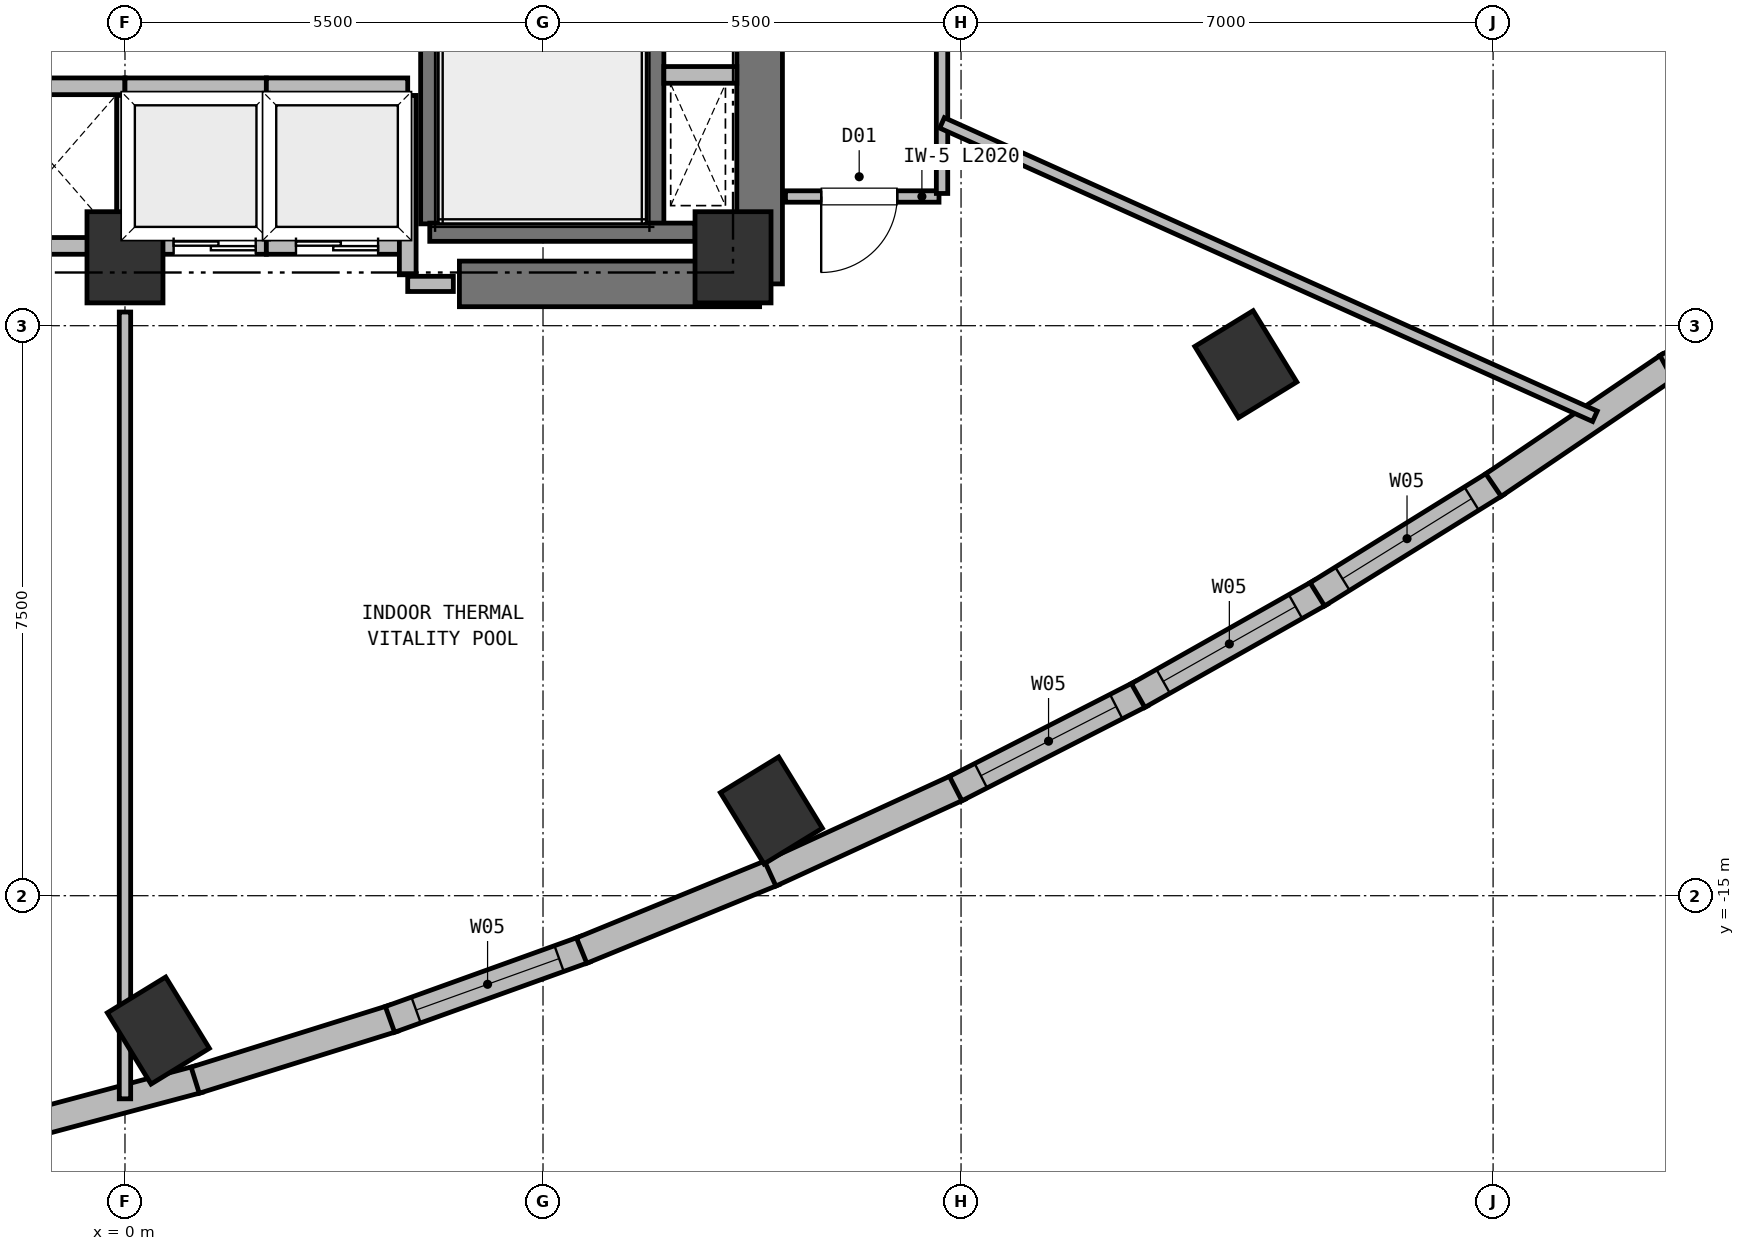
"""IFC4 building model, lengths in metres.
Left out: names, types, materials, properties, quantities, classifications, styles, units other than length and angle.
Written with IfcOpenShell. Run it as: python <this file> out.ifc"""

import sys

from ifc_helpers import new_model, si_unit, direction, frame, frame_2d, origin, origin_2d, place, context, subcontext, project, spatial, rectangle, extrude, element, fill, save


model = new_model("IFC4")
c1 = context("Model", 3, precision=1e-05, world=origin(), true_north=direction((0.0, 1.0)))
c2 = subcontext(c1, "Body", "Model", "MODEL_VIEW")
j1 = project(units=[si_unit("LENGTHUNIT", "METRE"), si_unit("PLANEANGLEUNIT", "RADIAN")], contexts=[c1])
p1 = place(None, origin())
s1 = spatial("IfcSite", under=j1, at=p1, CompositionType="ELEMENT")
p2 = place(p1, origin())
s2 = spatial("IfcBuilding", under=s1, at=p2, CompositionType="ELEMENT")
p3 = place(p2, frame((0.0, 0.0, 92.75)))
s3 = spatial("IfcBuildingStorey", under=s2, at=p3, CompositionType="ELEMENT", Elevation=92.75)
for number, where, z_axis, x_axis in (
    (1, (0.0, -6.6, 0.0), (0.0, 0.0, 1.0), (1.0, 0.0, 0.0)),
    (2, (8.0, -6.6, 0.0), (0.0, 0.0, 1.0), (1.0, 0.0, 0.0)),
):
    element("IfcColumn", number, at=place(p3, frame(where, z_axis=z_axis, x_axis=x_axis)), inside=s3, PredefinedType="COLUMN", context=c2, shape_type="SweptSolid", body=[
        extrude(rectangle(XDim=1.0, YDim=1.2, at=origin_2d()), origin(), (0.0, 0.0, 1.0), 4.5),
    ])
p4 = place(p3, frame((4.4, -6.95, 0.0), z_axis=(0.0, 0.0, 1.0), x_axis=(1.0, 0.0, 0.0)))
e3 = element("IfcWall", 3, at=p4, inside=s3, PredefinedType="SHEAR", context=c2, shape_type="SweptSolid", body=[
    extrude(rectangle(XDim=3.95, YDim=0.6, at=frame_2d((1.975, 0.0))), origin(), (0.0, 0.0, 1.0), 4.25),
])
p5 = place(p3, frame((8.35, -6.95, 0.0), z_axis=(0.0, 0.0, 1.0), x_axis=(0.0, 1.0, 0.0)))
e4 = element("IfcWall", 4, at=p5, inside=s3, PredefinedType="SHEAR", context=c2, shape_type="SweptSolid", body=[
    extrude(rectangle(XDim=8.1, YDim=0.6, at=frame_2d((4.05, 0.0))), origin(), (0.0, 0.0, 1.0), 4.25),
])
for number, where, z_axis, x_axis in (
    (5, (0.439, -16.774, 0.0), (0.0, 0.0, 1.0), (0.853, 0.522, 0.0)),
    (6, (8.504, -13.878, 0.0), (0.0, 0.0, 1.0), (0.853, 0.522, 0.0)),
    (7, (14.747, -8.007, 0.0), (0.0, 0.0, 1.0), (0.853, 0.522, 0.0)),
):
    element("IfcColumn", number, at=place(p3, frame(where, z_axis=z_axis, x_axis=x_axis)), inside=s3, PredefinedType="COLUMN", context=c2, shape_type="SweptSolid", body=[
        extrude(rectangle(XDim=0.9, YDim=1.1, at=origin_2d()), origin(), (0.0, 0.0, 1.0), 4.5),
    ])
p6 = place(p3, frame((0.972, -17.413, 0.0), z_axis=(0.0, 0.0, 1.0), x_axis=(-0.966234939601, -0.25766265056, 0.0)))
e8 = element("IfcWall", 8, at=p6, inside=s3, PredefinedType="SOLIDWALL", context=c2, shape_type="SweptSolid", body=[
    extrude(rectangle(XDim=2.744, YDim=0.36, at=frame_2d((1.372, 0.0))), origin(), (0.0, 0.0, 1.0), 4.25),
])
p7 = place(p3, frame((3.534, -16.612, 0.0), z_axis=(0.0, 0.0, 1.0), x_axis=(-0.954503804453, -0.298198737899, 0.0)))
e9 = element("IfcWall", 9, at=p7, inside=s3, PredefinedType="SOLIDWALL", context=c2, shape_type="SweptSolid", body=[
    extrude(rectangle(XDim=2.735, YDim=0.36, at=frame_2d((1.367, 0.0))), origin(), (0.0, 0.0, 1.0), 4.25),
])
p8 = place(p3, frame((6.055, -15.704, 0.0), z_axis=(0.0, 0.0, 1.0), x_axis=(-0.940978598113, -0.338466066089, 0.0)))
e10 = element("IfcWall", 10, at=p8, inside=s3, PredefinedType="SOLIDWALL", context=c2, shape_type="SweptSolid", body=[
    extrude(rectangle(XDim=2.729, YDim=0.36, at=frame_2d((1.365, 0.0))), origin(), (0.0, 0.0, 1.0), 4.25),
])
p9 = place(p8, frame((0.365, 0.0, 0.72)))
e11 = element("IfcOpeningElement", 11, at=p9, cuts=e10, PredefinedType="OPENING", context=c2, shape_type="SweptSolid", body=[
    extrude(rectangle(XDim=2.0, YDim=2.15, at=frame_2d((1.0, 1.075))), frame((0.0, 0.19, 0.0), z_axis=(0.0, -1.0, 0.0), x_axis=(1.0, 0.0, 0.0)), (0.0, 0.0, 1.0), 0.38),
])
p10 = place(p3, frame((8.535, -14.69, 0.0), z_axis=(0.0, 0.0, 1.0), x_axis=(-0.925769066795, -0.378089453656, 0.0)))
e12 = element("IfcWall", 12, at=p10, inside=s3, PredefinedType="SOLIDWALL", context=c2, shape_type="SweptSolid", body=[
    extrude(rectangle(XDim=2.729, YDim=0.36, at=frame_2d((1.365, 0.0))), origin(), (0.0, 0.0, 1.0), 4.25),
])
p11 = place(p3, frame((10.975, -13.569, 0.0), z_axis=(0.0, 0.0, 1.0), x_axis=(-0.908890021948, -0.417035883352, 0.0)))
e13 = element("IfcWall", 13, at=p11, inside=s3, PredefinedType="SOLIDWALL", context=c2, shape_type="SweptSolid", body=[
    extrude(rectangle(XDim=2.734, YDim=0.36, at=frame_2d((1.367, 0.0))), origin(), (0.0, 0.0, 1.0), 4.25),
])
p12 = place(p3, frame((13.373, -12.342, 0.0), z_axis=(0.0, 0.0, 1.0), x_axis=(-0.890460318586, -0.455060898148, 0.0)))
e14 = element("IfcWall", 14, at=p12, inside=s3, PredefinedType="SOLIDWALL", context=c2, shape_type="SweptSolid", body=[
    extrude(rectangle(XDim=2.744, YDim=0.36, at=frame_2d((1.372, 0.0))), origin(), (0.0, 0.0, 1.0), 4.25),
])
p13 = place(p12, frame((0.372, 0.0, 0.72)))
e15 = element("IfcOpeningElement", 15, at=p13, cuts=e14, PredefinedType="OPENING", context=c2, shape_type="SweptSolid", body=[
    extrude(rectangle(XDim=2.0, YDim=2.15, at=frame_2d((1.0, 1.075))), frame((0.0, 0.19, 0.0), z_axis=(0.0, -1.0, 0.0), x_axis=(1.0, 0.0, 0.0)), (0.0, 0.0, 1.0), 0.38),
])
p14 = place(p3, frame((15.731, -11.009, 0.0), z_axis=(0.0, 0.0, 1.0), x_axis=(-0.870678208182, -0.491853085582, 0.0)))
e16 = element("IfcWall", 16, at=p14, inside=s3, PredefinedType="SOLIDWALL", context=c2, shape_type="SweptSolid", body=[
    extrude(rectangle(XDim=2.758, YDim=0.36, at=frame_2d((1.379, 0.0))), origin(), (0.0, 0.0, 1.0), 4.25),
])
p15 = place(p14, frame((0.379, 0.0, 0.72)))
e17 = element("IfcOpeningElement", 17, at=p15, cuts=e16, PredefinedType="OPENING", context=c2, shape_type="SweptSolid", body=[
    extrude(rectangle(XDim=2.0, YDim=2.15, at=frame_2d((1.0, 1.075))), frame((0.0, 0.19, 0.0), z_axis=(0.0, -1.0, 0.0), x_axis=(1.0, 0.0, 0.0)), (0.0, 0.0, 1.0), 0.38),
])
p16 = place(p3, frame((18.048, -9.57, 0.0), z_axis=(0.0, 0.0, 1.0), x_axis=(-0.84962386879, -0.527389117809, 0.0)))
e18 = element("IfcWall", 18, at=p16, inside=s3, PredefinedType="SOLIDWALL", context=c2, shape_type="SweptSolid", body=[
    extrude(rectangle(XDim=2.778, YDim=0.36, at=frame_2d((1.389, 0.0))), origin(), (0.0, 0.0, 1.0), 4.25),
])
p17 = place(p16, frame((0.389, 0.0, 0.72)))
e19 = element("IfcOpeningElement", 19, at=p17, cuts=e18, PredefinedType="OPENING", context=c2, shape_type="SweptSolid", body=[
    extrude(rectangle(XDim=2.0, YDim=2.15, at=frame_2d((1.0, 1.075))), frame((0.0, 0.19, 0.0), z_axis=(0.0, -1.0, 0.0), x_axis=(1.0, 0.0, 0.0)), (0.0, 0.0, 1.0), 0.38),
])
p18 = place(p3, frame((20.323, -8.024, 0.0), z_axis=(0.0, 0.0, 1.0), x_axis=(-0.82749023723, -0.56148010409, 0.0)))
e20 = element("IfcWall", 20, at=p18, inside=s3, PredefinedType="SOLIDWALL", context=c2, shape_type="SweptSolid", body=[
    extrude(rectangle(XDim=2.801, YDim=0.36, at=frame_2d((1.4, 0.0))), origin(), (0.0, 0.0, 1.0), 4.25),
])
p19 = place(p3, frame((21.587, -7.341, 0.0), z_axis=(0.0, 0.0, 1.0), x_axis=(-0.87890460574, -0.476997582812, 0.0)))
e21 = element("IfcWall", 21, at=p19, inside=s3, PredefinedType="SOLIDWALL", context=c2, shape_type="SweptSolid", body=[
    extrude(rectangle(XDim=1.486, YDim=0.36, at=frame_2d((0.743, 0.0))), origin(), (0.0, 0.0, 1.0), 4.25),
])
for number, where, z_axis, x_axis in (
    (22, (4.01, -6.16, 0.0), (0.0, 0.0, 1.0), (0.0, 1.0, 0.0)),
    (23, (6.97, -6.16, 0.0), (0.0, 0.0, 1.0), (0.0, 1.0, 0.0)),
):
    element("IfcWall", number, at=place(p3, frame(where, z_axis=z_axis, x_axis=x_axis)), inside=s3, PredefinedType="SHEAR", context=c2, shape_type="SweptSolid", body=[
        extrude(rectangle(XDim=7.22, YDim=0.24, at=frame_2d((3.61, 0.0))), origin(), (0.0, 0.0, 1.0), 4.25),
    ])
p20 = place(p3, frame((4.01, -6.27, 0.0), z_axis=(0.0, 0.0, 1.0), x_axis=(1.0, 0.0, 0.0)))
e24 = element("IfcWall", 24, at=p20, inside=s3, PredefinedType="SHEAR", context=c2, shape_type="SweptSolid", body=[
    extrude(rectangle(XDim=3.49, YDim=0.24, at=frame_2d((1.745, 0.0))), origin(), (0.0, 0.0, 1.0), 4.25),
])
p21 = place(p3, frame((7.09, -4.2, 0.0), z_axis=(0.0, 0.0, 1.0), x_axis=(1.0, 0.0, 0.0)))
e25 = element("IfcWall", 25, at=p21, inside=s3, PredefinedType="PARTITIONING", context=c2, shape_type="SweptSolid", body=[
    extrude(rectangle(XDim=0.96, YDim=0.22, at=frame_2d((0.48, 0.0))), origin(), (0.0, 0.0, 1.0), 4.25),
])
p22 = place(p3, frame((-1.86, -6.45, 0.0), z_axis=(0.0, 0.0, 1.0), x_axis=(1.0, 0.0, 0.0)))
e26 = element("IfcWall", 26, at=p22, inside=s3, PredefinedType="PARTITIONING", context=c2, shape_type="SweptSolid", body=[
    extrude(rectangle(XDim=1.86, YDim=0.22, at=frame_2d((0.93, 0.0))), origin(), (0.0, 0.0, 1.0), 3.87),
])
for number, where, z_axis, x_axis in (
    (27, (-1.86, -4.35, 0.0), (0.0, 0.0, 1.0), (1.0, 0.0, 0.0)),
    (28, (0.0, -6.33, 0.0), (0.0, 0.0, 1.0), (0.0, 1.0, 0.0)),
):
    element("IfcWall", number, at=place(p3, frame(where, z_axis=z_axis, x_axis=x_axis)), inside=s3, PredefinedType="PARTITIONING", context=c2, shape_type="SweptSolid", body=[
        extrude(rectangle(XDim=1.86, YDim=0.22, at=frame_2d((0.93, 0.0))), origin(), (0.0, 0.0, 1.0), 4.25),
    ])
p23 = place(p3, frame((0.0, -6.45, 0.0), z_axis=(0.0, 0.0, 1.0), x_axis=(1.0, 0.0, 0.0)))
e29 = element("IfcWall", 29, at=p23, inside=s3, PredefinedType="PARTITIONING", context=c2, shape_type="SweptSolid", body=[
    extrude(rectangle(XDim=1.86, YDim=0.22, at=frame_2d((0.93, 0.0))), origin(), (0.0, 0.0, 1.0), 3.87),
])
p24 = place(p23, frame((0.64, 0.0, 0.0)))
e30 = element("IfcOpeningElement", 30, at=p24, cuts=e29, PredefinedType="OPENING", context=c2, shape_type="SweptSolid", body=[
    extrude(rectangle(XDim=1.08, YDim=2.15, at=frame_2d((0.54, 1.075))), frame((0.0, 0.12, 0.0), z_axis=(0.0, -1.0, 0.0), x_axis=(1.0, 0.0, 0.0)), (0.0, 0.0, 1.0), 0.24),
])
for number, where, z_axis, x_axis in (
    (31, (0.0, -4.35, 0.0), (0.0, 0.0, 1.0), (1.0, 0.0, 0.0)),
    (32, (1.86, -6.33, 0.0), (0.0, 0.0, 1.0), (0.0, 1.0, 0.0)),
):
    element("IfcWall", number, at=place(p3, frame(where, z_axis=z_axis, x_axis=x_axis)), inside=s3, PredefinedType="PARTITIONING", context=c2, shape_type="SweptSolid", body=[
        extrude(rectangle(XDim=1.86, YDim=0.22, at=frame_2d((0.93, 0.0))), origin(), (0.0, 0.0, 1.0), 4.25),
    ])
p25 = place(p3, frame((1.86, -6.45, 0.0), z_axis=(0.0, 0.0, 1.0), x_axis=(1.0, 0.0, 0.0)))
e33 = element("IfcWall", 33, at=p25, inside=s3, PredefinedType="PARTITIONING", context=c2, shape_type="SweptSolid", body=[
    extrude(rectangle(XDim=1.86, YDim=0.22, at=frame_2d((0.93, 0.0))), origin(), (0.0, 0.0, 1.0), 3.87),
])
p26 = place(p25, frame((0.39, 0.0, 0.0)))
e34 = element("IfcOpeningElement", 34, at=p26, cuts=e33, PredefinedType="OPENING", context=c2, shape_type="SweptSolid", body=[
    extrude(rectangle(XDim=1.08, YDim=2.15, at=frame_2d((0.54, 1.075))), frame((0.0, 0.12, 0.0), z_axis=(0.0, -1.0, 0.0), x_axis=(1.0, 0.0, 0.0)), (0.0, 0.0, 1.0), 0.24),
])
p27 = place(p3, frame((1.86, -4.35, 0.0), z_axis=(0.0, 0.0, 1.0), x_axis=(1.0, 0.0, 0.0)))
e35 = element("IfcWall", 35, at=p27, inside=s3, PredefinedType="PARTITIONING", context=c2, shape_type="SweptSolid", body=[
    extrude(rectangle(XDim=1.86, YDim=0.22, at=frame_2d((0.93, 0.0))), origin(), (0.0, 0.0, 1.0), 4.25),
])
p28 = place(p3, frame((3.72, -6.83, 0.0), z_axis=(0.0, 0.0, 1.0), x_axis=(0.0, 1.0, 0.0)))
e36 = element("IfcWall", 36, at=p28, inside=s3, PredefinedType="PARTITIONING", context=c2, shape_type="SweptSolid", body=[
    extrude(rectangle(XDim=2.36, YDim=0.22, at=frame_2d((1.18, 0.0))), origin(), (0.0, 0.0, 1.0), 4.25),
])
p29 = place(p3, frame((3.72, -6.95, 0.0), z_axis=(0.0, 0.0, 1.0), x_axis=(1.0, 0.0, 0.0)))
e37 = element("IfcWall", 37, at=p29, inside=s3, PredefinedType="PARTITIONING", context=c2, shape_type="SweptSolid", body=[
    extrude(rectangle(XDim=0.6, YDim=0.2, at=frame_2d((0.3, 0.0))), origin(), (0.0, 0.0, 1.0), 4.25),
])
p30 = place(p3, frame((10.71, -5.8, 0.0), z_axis=(0.0, 0.0, 1.0), x_axis=(-1.0, 0.0, 0.0)))
e38 = element("IfcWall", 38, at=p30, inside=s3, PredefinedType="PARTITIONING", context=c2, shape_type="SweptSolid", body=[
    extrude(rectangle(XDim=2.02, YDim=0.15, at=frame_2d((1.01, 0.0))), origin(), (0.0, 0.0, 1.0), 4.25),
])
p31 = place(p30, frame((0.55, 0.0, 0.0)))
e39 = element("IfcOpeningElement", 39, at=p31, cuts=e38, PredefinedType="OPENING", context=c2, shape_type="SweptSolid", body=[
    extrude(rectangle(XDim=1.0, YDim=2.15, at=frame_2d((0.5, 1.075))), frame((0.0, 0.085, 0.0), z_axis=(0.0, -1.0, 0.0), x_axis=(1.0, 0.0, 0.0)), (0.0, 0.0, 1.0), 0.17),
])
p32 = place(p3, frame((10.75, 7.16, 0.0), z_axis=(0.0, 0.0, 1.0), x_axis=(0.0, -1.0, 0.0)))
e40 = element("IfcWall", 40, at=p32, inside=s3, PredefinedType="PARTITIONING", context=c2, shape_type="SweptSolid", body=[
    extrude(rectangle(XDim=12.92, YDim=0.15, at=frame_2d((6.46, 0.0))), origin(), (0.0, 0.0, 1.0), 4.25),
])
p33 = place(p32, frame((5.613, 0.0, 0.0)))
e41 = element("IfcOpeningElement", 41, at=p33, cuts=e40, PredefinedType="OPENING", context=c2, shape_type="SweptSolid", body=[
    extrude(rectangle(XDim=1.06, YDim=2.15, at=frame_2d((0.53, 1.075))), frame((0.0, 0.085, 0.0), z_axis=(0.0, -1.0, 0.0), x_axis=(1.0, 0.0, 0.0)), (0.0, 0.0, 1.0), 0.17),
])
p34 = place(p3, frame((0.0, -7.32, 0.0), z_axis=(0.0, 0.0, 1.0), x_axis=(0.0, -1.0, 0.0)))
e42 = element("IfcWall", 42, at=p34, inside=s3, PredefinedType="PARTITIONING", context=c2, shape_type="SweptSolid", body=[
    extrude(rectangle(XDim=10.353, YDim=0.15, at=frame_2d((5.176, 0.0))), origin(), (0.0, 0.0, 1.0), 4.25),
])
p35 = place(p3, frame((10.75, -4.831, 0.0), z_axis=(0.0, 0.0, 1.0), x_axis=(0.912123184647, -0.409916206106, 0.0)))
e43 = element("IfcWall", 43, at=p35, inside=s3, PredefinedType="PARTITIONING", context=c2, shape_type="SweptSolid", body=[
    extrude(rectangle(XDim=9.417, YDim=0.15, at=frame_2d((4.709, 0.0))), origin(), (0.0, 0.0, 1.0), 4.25),
])
p36 = place(p9, origin())
e44 = element("IfcWindow", 44, at=p36, inside=s3, PartitioningType="SINGLE_PANEL", PredefinedType="WINDOW", context=c2, shape_type="SweptSolid", body=[
    extrude(rectangle(XDim=2.0, YDim=2.15, at=frame_2d((1.0, 1.075))), frame((0.0, 0.03, 0.0), z_axis=(0.0, -1.0, 0.0), x_axis=(1.0, 0.0, 0.0)), (0.0, 0.0, 1.0), 0.06),
])
fill(e11, e44)
p37 = place(p13, origin())
e45 = element("IfcWindow", 45, at=p37, inside=s3, PartitioningType="SINGLE_PANEL", PredefinedType="WINDOW", context=c2, shape_type="SweptSolid", body=[
    extrude(rectangle(XDim=2.0, YDim=2.15, at=frame_2d((1.0, 1.075))), frame((0.0, 0.03, 0.0), z_axis=(0.0, -1.0, 0.0), x_axis=(1.0, 0.0, 0.0)), (0.0, 0.0, 1.0), 0.06),
])
fill(e15, e45)
p38 = place(p15, origin())
e46 = element("IfcWindow", 46, at=p38, inside=s3, PartitioningType="SINGLE_PANEL", PredefinedType="WINDOW", context=c2, shape_type="SweptSolid", body=[
    extrude(rectangle(XDim=2.0, YDim=2.15, at=frame_2d((1.0, 1.075))), frame((0.0, 0.03, 0.0), z_axis=(0.0, -1.0, 0.0), x_axis=(1.0, 0.0, 0.0)), (0.0, 0.0, 1.0), 0.06),
])
fill(e17, e46)
p39 = place(p17, origin())
e47 = element("IfcWindow", 47, at=p39, inside=s3, PartitioningType="SINGLE_PANEL", PredefinedType="WINDOW", context=c2, shape_type="SweptSolid", body=[
    extrude(rectangle(XDim=2.0, YDim=2.15, at=frame_2d((1.0, 1.075))), frame((0.0, 0.03, 0.0), z_axis=(0.0, -1.0, 0.0), x_axis=(1.0, 0.0, 0.0)), (0.0, 0.0, 1.0), 0.06),
])
fill(e19, e47)
p40 = place(p24, origin())
e48 = element("IfcDoor", 48, at=p40, inside=s3, OperationType="DOUBLE_DOOR_SLIDING", PredefinedType="DOOR", context=c2, shape_type="SweptSolid", body=[
    extrude(rectangle(XDim=1.08, YDim=2.15, at=frame_2d((0.54, 1.075))), frame((0.0, 0.025, 0.0), z_axis=(0.0, -1.0, 0.0), x_axis=(1.0, 0.0, 0.0)), (0.0, 0.0, 1.0), 0.05),
])
fill(e30, e48)
p41 = place(p26, origin())
e49 = element("IfcDoor", 49, at=p41, inside=s3, OperationType="DOUBLE_DOOR_SLIDING", PredefinedType="DOOR", context=c2, shape_type="SweptSolid", body=[
    extrude(rectangle(XDim=1.08, YDim=2.15, at=frame_2d((0.54, 1.075))), frame((0.0, 0.025, 0.0), z_axis=(0.0, -1.0, 0.0), x_axis=(1.0, 0.0, 0.0)), (0.0, 0.0, 1.0), 0.05),
])
fill(e34, e49)
p42 = place(p31, origin())
e50 = element("IfcDoor", 50, at=p42, inside=s3, OperationType="SINGLE_SWING_RIGHT", PredefinedType="DOOR", context=c2, shape_type="SweptSolid", body=[
    extrude(rectangle(XDim=1.0, YDim=2.15, at=frame_2d((0.5, 1.075))), frame((0.0, 0.025, 0.0), z_axis=(0.0, -1.0, 0.0), x_axis=(1.0, 0.0, 0.0)), (0.0, 0.0, 1.0), 0.05),
])
fill(e39, e50)
save(model, sys.argv[1])
